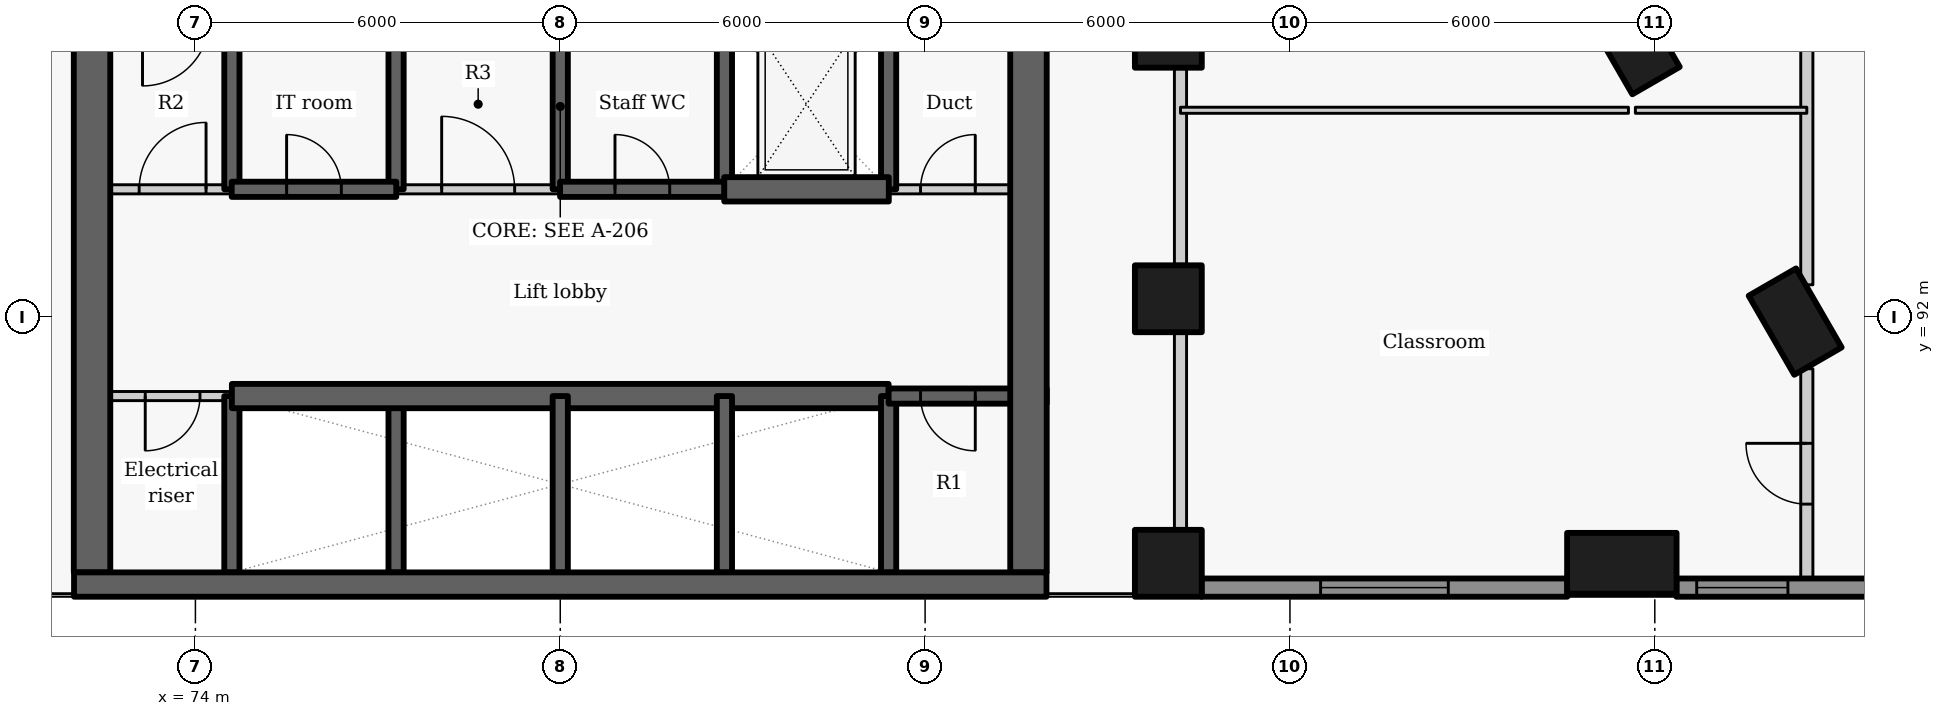
"""IFC4 building model, lengths in metres.
Left out: names, types, materials, properties, quantities, classifications, styles, units other than length and angle.
Written with IfcOpenShell. Run it as: python <this file> out.ifc"""

import sys

from ifc_helpers import new_model, si_unit, direction, frame, frame_2d, origin, origin_2d, place, context, subcontext, project, spatial, rectangle, extrude, element, fill, save


model = new_model("IFC4")
c1 = context("Model", 3, precision=1e-05, world=origin(), true_north=direction((0.0, 1.0)))
c2 = subcontext(c1, "Body", "Model", "MODEL_VIEW")
j1 = project(units=[si_unit("LENGTHUNIT", "METRE"), si_unit("PLANEANGLEUNIT", "RADIAN")], contexts=[c1])
p1 = place(None, origin())
s1 = spatial("IfcSite", under=j1, at=p1, CompositionType="ELEMENT")
p2 = place(p1, origin())
s2 = spatial("IfcBuilding", under=s1, at=p2, CompositionType="ELEMENT")
p3 = place(p2, frame((0.0, 0.0, 24.0)))
s3 = spatial("IfcBuildingStorey", under=s2, at=p3, CompositionType="ELEMENT", Elevation=24.0)
for number, where, z_axis, x_axis in (
    (1, (100.308, 91.925, 0.0), (0.0, 0.0, 1.0), (-0.5, 0.866, 0.0)),
    (2, (97.646, 96.537, 0.0), (0.0, 0.0, 1.0), (-0.5, 0.866, 0.0)),
):
    element("IfcColumn", number, at=place(p3, frame(where, z_axis=z_axis, x_axis=x_axis)), inside=s3, PredefinedType="COLUMN", context=c2, shape_type="SweptSolid", body=[
        extrude(rectangle(XDim=1.5, YDim=0.9, at=origin_2d()), origin(), (0.0, 0.0, 1.0), 4.2),
    ])
for number, where, z_axis, x_axis in (
    (3, (90.0, 87.95, 0.0), (0.0, 0.0, 1.0), (0.0, 1.0, 0.0)),
    (4, (90.0, 92.3, 0.0), (0.0, 0.0, 1.0), (0.0, 1.0, 0.0)),
    (5, (90.0, 96.65, 0.0), (0.0, 0.0, 1.0), (0.0, 1.0, 0.0)),
):
    element("IfcColumn", number, at=place(p3, frame(where, z_axis=z_axis, x_axis=x_axis)), inside=s3, PredefinedType="COLUMN", context=c2, shape_type="SweptSolid", body=[
        extrude(rectangle(XDim=1.1, YDim=1.1, at=origin_2d()), origin(), (0.0, 0.0, 1.0), 4.2),
    ])
p4 = place(p3, frame((97.458, 87.95, 0.0), z_axis=(0.0, 0.0, 1.0), x_axis=(1.0, 0.0, 0.0)))
e6 = element("IfcColumn", 6, at=p4, inside=s3, PredefinedType="COLUMN", context=c2, shape_type="SweptSolid", body=[
    extrude(rectangle(XDim=1.8, YDim=1.0, at=origin_2d()), origin(), (0.0, 0.0, 1.0), 4.2),
])
p5 = place(p3, frame((90.546, 87.55, 0.0), z_axis=(0.0, 0.0, 1.0), x_axis=(1.0, 0.0, 0.0)))
e7 = element("IfcWall", 7, at=p5, inside=s3, PredefinedType="SOLIDWALL", context=c2, shape_type="SweptSolid", body=[
    extrude(rectangle(XDim=6.016, YDim=0.3, at=frame_2d((3.008, 0.0))), origin(), (0.0, 0.0, 1.0), 3.325),
])
p6 = place(p5, frame((1.958, 0.0, 0.9)))
e8 = element("IfcOpeningElement", 8, at=p6, cuts=e7, PredefinedType="OPENING", context=c2, shape_type="SweptSolid", body=[
    extrude(rectangle(XDim=2.1, YDim=2.05, at=frame_2d((1.05, 1.025))), frame((0.0, 0.16, 0.0), z_axis=(0.0, -1.0, 0.0), x_axis=(1.0, 0.0, 0.0)), (0.0, 0.0, 1.0), 0.32),
])
p7 = place(p3, frame((98.354, 87.55, 0.0), z_axis=(0.0, 0.0, 1.0), x_axis=(1.0, 0.0, 0.0)))
e9 = element("IfcWall", 9, at=p7, inside=s3, PredefinedType="SOLIDWALL", context=c2, shape_type="SweptSolid", body=[
    extrude(rectangle(XDim=3.973, YDim=0.3, at=frame_2d((1.986, 0.0))), origin(), (0.0, 0.0, 1.0), 3.325),
])
p8 = place(p7, frame((0.335, 0.0, 0.9)))
e10 = element("IfcOpeningElement", 10, at=p8, cuts=e9, PredefinedType="OPENING", context=c2, shape_type="SweptSolid", body=[
    extrude(rectangle(XDim=1.5, YDim=2.05, at=frame_2d((0.75, 1.025))), frame((0.0, 0.16, 0.0), z_axis=(0.0, -1.0, 0.0), x_axis=(1.0, 0.0, 0.0)), (0.0, 0.0, 1.0), 0.32),
])
p9 = place(p3, frame((74.6, 87.8, -0.3), z_axis=(0.0, 0.0, 1.0), x_axis=(0.0, 1.0, 0.0)))
e11 = element("IfcWall", 11, at=p9, inside=s3, PredefinedType="SHEAR", context=c2, shape_type="SweptSolid", body=[
    extrude(rectangle(XDim=2.9, YDim=0.25, at=frame_2d((1.45, 0.0))), origin(), (0.0, 0.0, 1.0), 4.225),
])
p10 = place(p3, frame((74.6, 94.1, -0.3), z_axis=(0.0, 0.0, 1.0), x_axis=(0.0, 1.0, 0.0)))
e12 = element("IfcWall", 12, at=p10, inside=s3, PredefinedType="SHEAR", context=c2, shape_type="SweptSolid", body=[
    extrude(rectangle(XDim=2.8, YDim=0.25, at=frame_2d((1.4, 0.0))), origin(), (0.0, 0.0, 1.0), 4.225),
])
p11 = place(p3, frame((74.6, 90.7, 0.0), z_axis=(0.0, 0.0, 1.0), x_axis=(-1.0, 0.0, 0.0)))
e13 = element("IfcWall", 13, at=p11, inside=s3, PredefinedType="PARTITIONING", context=c2, shape_type="SweptSolid", body=[
    extrude(rectangle(XDim=2.6, YDim=0.15, at=frame_2d((1.3, 0.0))), origin(), (0.0, 0.0, 1.0), 3.925),
])
p12 = place(p11, frame((0.525, 0.0, 0.0)))
e14 = element("IfcOpeningElement", 14, at=p12, cuts=e13, PredefinedType="OPENING", context=c2, shape_type="SweptSolid", body=[
    extrude(rectangle(XDim=0.9, YDim=2.1, at=frame_2d((0.45, 1.05))), frame((0.0, 0.085, 0.0), z_axis=(0.0, -1.0, 0.0), x_axis=(1.0, 0.0, 0.0)), (0.0, 0.0, 1.0), 0.17),
])
p13 = place(p3, frame((72.3, 87.8, -0.3), z_axis=(0.0, 0.0, 1.0), x_axis=(0.0, 1.0, 0.0)))
e15 = element("IfcWall", 15, at=p13, inside=s3, PredefinedType="SHEAR", context=c2, shape_type="SweptSolid", body=[
    extrude(rectangle(XDim=9.1, YDim=0.6, at=frame_2d((4.55, 0.0))), origin(), (0.0, 0.0, 1.0), 4.225),
])
p14 = place(p3, frame((77.3, 87.8, -0.3), z_axis=(0.0, 0.0, 1.0), x_axis=(0.0, 1.0, 0.0)))
e16 = element("IfcWall", 16, at=p14, inside=s3, PredefinedType="SHEAR", context=c2, shape_type="SweptSolid", body=[
    extrude(rectangle(XDim=2.9, YDim=0.25, at=frame_2d((1.45, 0.0))), origin(), (0.0, 0.0, 1.0), 4.225),
])
p15 = place(p3, frame((77.3, 94.1, -0.3), z_axis=(0.0, 0.0, 1.0), x_axis=(0.0, 1.0, 0.0)))
e17 = element("IfcWall", 17, at=p15, inside=s3, PredefinedType="SHEAR", context=c2, shape_type="SweptSolid", body=[
    extrude(rectangle(XDim=2.8, YDim=0.25, at=frame_2d((1.4, 0.0))), origin(), (0.0, 0.0, 1.0), 4.225),
])
p16 = place(p3, frame((74.6, 90.7, -0.3), z_axis=(0.0, 0.0, 1.0), x_axis=(1.0, 0.0, 0.0)))
e18 = element("IfcWall", 18, at=p16, inside=s3, PredefinedType="SHEAR", context=c2, shape_type="SweptSolid", body=[
    extrude(rectangle(XDim=10.8, YDim=0.4, at=frame_2d((5.4, 0.0))), origin(), (0.0, 0.0, 1.0), 4.225),
])
p17 = place(p3, frame((80.0, 87.8, -0.3), z_axis=(0.0, 0.0, 1.0), x_axis=(0.0, 1.0, 0.0)))
e19 = element("IfcWall", 19, at=p17, inside=s3, PredefinedType="SHEAR", context=c2, shape_type="SweptSolid", body=[
    extrude(rectangle(XDim=2.9, YDim=0.25, at=frame_2d((1.45, 0.0))), origin(), (0.0, 0.0, 1.0), 4.225),
])
p18 = place(p3, frame((80.0, 94.1, -0.3), z_axis=(0.0, 0.0, 1.0), x_axis=(0.0, 1.0, 0.0)))
e20 = element("IfcWall", 20, at=p18, inside=s3, PredefinedType="SHEAR", context=c2, shape_type="SweptSolid", body=[
    extrude(rectangle(XDim=2.8, YDim=0.25, at=frame_2d((1.4, 0.0))), origin(), (0.0, 0.0, 1.0), 4.225),
])
p19 = place(p3, frame((82.7, 87.8, -0.3), z_axis=(0.0, 0.0, 1.0), x_axis=(0.0, 1.0, 0.0)))
e21 = element("IfcWall", 21, at=p19, inside=s3, PredefinedType="SHEAR", context=c2, shape_type="SweptSolid", body=[
    extrude(rectangle(XDim=2.9, YDim=0.25, at=frame_2d((1.45, 0.0))), origin(), (0.0, 0.0, 1.0), 4.225),
])
p20 = place(p3, frame((82.7, 94.1, -0.3), z_axis=(0.0, 0.0, 1.0), x_axis=(0.0, 1.0, 0.0)))
e22 = element("IfcWall", 22, at=p20, inside=s3, PredefinedType="SHEAR", context=c2, shape_type="SweptSolid", body=[
    extrude(rectangle(XDim=2.8, YDim=0.25, at=frame_2d((1.4, 0.0))), origin(), (0.0, 0.0, 1.0), 4.225),
])
p21 = place(p3, frame((85.4, 87.8, -0.3), z_axis=(0.0, 0.0, 1.0), x_axis=(0.0, 1.0, 0.0)))
e23 = element("IfcWall", 23, at=p21, inside=s3, PredefinedType="SHEAR", context=c2, shape_type="SweptSolid", body=[
    extrude(rectangle(XDim=2.9, YDim=0.25, at=frame_2d((1.45, 0.0))), origin(), (0.0, 0.0, 1.0), 4.225),
])
p22 = place(p3, frame((85.4, 94.1, -0.3), z_axis=(0.0, 0.0, 1.0), x_axis=(0.0, 1.0, 0.0)))
e24 = element("IfcWall", 24, at=p22, inside=s3, PredefinedType="SHEAR", context=c2, shape_type="SweptSolid", body=[
    extrude(rectangle(XDim=2.8, YDim=0.25, at=frame_2d((1.4, 0.0))), origin(), (0.0, 0.0, 1.0), 4.225),
])
p23 = place(p3, frame((88.0, 90.7, -0.3), z_axis=(0.0, 0.0, 1.0), x_axis=(-1.0, 0.0, 0.0)))
e25 = element("IfcWall", 25, at=p23, inside=s3, PredefinedType="SHEAR", context=c2, shape_type="SweptSolid", body=[
    extrude(rectangle(XDim=2.6, YDim=0.25, at=frame_2d((1.3, 0.0))), origin(), (0.0, 0.0, 1.0), 4.225),
])
p24 = place(p23, frame((1.175, 0.0, 0.3)))
e26 = element("IfcOpeningElement", 26, at=p24, cuts=e25, PredefinedType="OPENING", context=c2, shape_type="SweptSolid", body=[
    extrude(rectangle(XDim=0.9, YDim=2.1, at=frame_2d((0.45, 1.05))), frame((0.0, 0.135, 0.0), z_axis=(0.0, -1.0, 0.0), x_axis=(1.0, 0.0, 0.0)), (0.0, 0.0, 1.0), 0.27),
])
p25 = place(p3, frame((87.7, 103.4, -0.3), z_axis=(0.0, 0.0, 1.0), x_axis=(0.0, -1.0, 0.0)))
e27 = element("IfcWall", 27, at=p25, inside=s3, PredefinedType="SHEAR", context=c2, shape_type="SweptSolid", body=[
    extrude(rectangle(XDim=15.6, YDim=0.6, at=frame_2d((7.8, 0.0))), origin(), (0.0, 0.0, 1.0), 4.225),
])
p26 = place(p25, frame((2.7, 0.0, 0.3)))
e28 = element("IfcOpeningElement", 28, at=p26, cuts=e27, PredefinedType="OPENING", context=c2, shape_type="SweptSolid", body=[
    extrude(rectangle(XDim=1.1, YDim=2.1, at=frame_2d((0.55, 1.05))), frame((0.0, 0.31, 0.0), z_axis=(0.0, -1.0, 0.0), x_axis=(1.0, 0.0, 0.0)), (0.0, 0.0, 1.0), 0.62),
])
p27 = place(p3, frame((72.0, 94.1, 0.0), z_axis=(0.0, 0.0, 1.0), x_axis=(1.0, 0.0, 0.0)))
e29 = element("IfcWall", 29, at=p27, inside=s3, PredefinedType="PARTITIONING", context=c2, shape_type="SweptSolid", body=[
    extrude(rectangle(XDim=2.603, YDim=0.15, at=frame_2d((1.302, 0.0))), origin(), (0.0, 0.0, 1.0), 3.925),
])
p28 = place(p27, frame((1.075, 0.0, 0.0)))
e30 = element("IfcOpeningElement", 30, at=p28, cuts=e29, PredefinedType="OPENING", context=c2, shape_type="SweptSolid", body=[
    extrude(rectangle(XDim=1.1, YDim=2.1, at=frame_2d((0.55, 1.05))), frame((0.0, 0.085, 0.0), z_axis=(0.0, -1.0, 0.0), x_axis=(1.0, 0.0, 0.0)), (0.0, 0.0, 1.0), 0.17),
])
p29 = place(p3, frame((77.297, 94.1, 0.0), z_axis=(0.0, 0.0, 1.0), x_axis=(1.0, 0.0, 0.0)))
e31 = element("IfcWall", 31, at=p29, inside=s3, PredefinedType="PARTITIONING", context=c2, shape_type="SweptSolid", body=[
    extrude(rectangle(XDim=2.706, YDim=0.15, at=frame_2d((1.353, 0.0))), origin(), (0.0, 0.0, 1.0), 3.925),
])
p30 = place(p29, frame((0.753, 0.0, 0.0)))
e32 = element("IfcOpeningElement", 32, at=p30, cuts=e31, PredefinedType="OPENING", context=c2, shape_type="SweptSolid", body=[
    extrude(rectangle(XDim=1.2, YDim=2.1, at=frame_2d((0.6, 1.05))), frame((0.0, 0.085, 0.0), z_axis=(0.0, -1.0, 0.0), x_axis=(1.0, 0.0, 0.0)), (0.0, 0.0, 1.0), 0.17),
])
p31 = place(p3, frame((85.397, 94.1, 0.0), z_axis=(0.0, 0.0, 1.0), x_axis=(1.0, 0.0, 0.0)))
e33 = element("IfcWall", 33, at=p31, inside=s3, PredefinedType="PARTITIONING", context=c2, shape_type="SweptSolid", body=[
    extrude(rectangle(XDim=2.603, YDim=0.15, at=frame_2d((1.302, 0.0))), origin(), (0.0, 0.0, 1.0), 3.925),
])
p32 = place(p31, frame((0.528, 0.0, 0.0)))
e34 = element("IfcOpeningElement", 34, at=p32, cuts=e33, PredefinedType="OPENING", context=c2, shape_type="SweptSolid", body=[
    extrude(rectangle(XDim=0.9, YDim=2.1, at=frame_2d((0.45, 1.05))), frame((0.0, 0.085, 0.0), z_axis=(0.0, -1.0, 0.0), x_axis=(1.0, 0.0, 0.0)), (0.0, 0.0, 1.0), 0.17),
])
p33 = place(p3, frame((74.597, 94.1, -0.3), z_axis=(0.0, 0.0, 1.0), x_axis=(1.0, 0.0, 0.0)))
e35 = element("IfcWall", 35, at=p33, inside=s3, PredefinedType="SHEAR", context=c2, shape_type="SweptSolid", body=[
    extrude(rectangle(XDim=2.706, YDim=0.25, at=frame_2d((1.353, 0.0))), origin(), (0.0, 0.0, 1.0), 4.225),
])
p34 = place(p33, frame((0.903, 0.0, 0.3)))
e36 = element("IfcOpeningElement", 36, at=p34, cuts=e35, PredefinedType="OPENING", context=c2, shape_type="SweptSolid", body=[
    extrude(rectangle(XDim=0.9, YDim=2.1, at=frame_2d((0.45, 1.05))), frame((0.0, 0.135, 0.0), z_axis=(0.0, -1.0, 0.0), x_axis=(1.0, 0.0, 0.0)), (0.0, 0.0, 1.0), 0.27),
])
p35 = place(p3, frame((79.997, 94.1, -0.3), z_axis=(0.0, 0.0, 1.0), x_axis=(1.0, 0.0, 0.0)))
e37 = element("IfcWall", 37, at=p35, inside=s3, PredefinedType="SHEAR", context=c2, shape_type="SweptSolid", body=[
    extrude(rectangle(XDim=2.706, YDim=0.25, at=frame_2d((1.353, 0.0))), origin(), (0.0, 0.0, 1.0), 4.225),
])
p36 = place(p35, frame((0.903, 0.0, 0.3)))
e38 = element("IfcOpeningElement", 38, at=p36, cuts=e37, PredefinedType="OPENING", context=c2, shape_type="SweptSolid", body=[
    extrude(rectangle(XDim=0.9, YDim=2.1, at=frame_2d((0.45, 1.05))), frame((0.0, 0.135, 0.0), z_axis=(0.0, -1.0, 0.0), x_axis=(1.0, 0.0, 0.0)), (0.0, 0.0, 1.0), 0.27),
])
p37 = place(p3, frame((82.697, 94.1, -0.3), z_axis=(0.0, 0.0, 1.0), x_axis=(1.0, 0.0, 0.0)))
e39 = element("IfcWall", 39, at=p37, inside=s3, PredefinedType="SHEAR", context=c2, shape_type="SweptSolid", body=[
    extrude(rectangle(XDim=2.706, YDim=0.4, at=frame_2d((1.353, 0.0))), origin(), (0.0, 0.0, 1.0), 4.225),
])
p38 = place(p3, frame((100.5, 87.7, 0.0), z_axis=(0.0, 0.0, 1.0), x_axis=(0.0, 1.0, 0.0)))
e40 = element("IfcWall", 40, at=p38, inside=s3, PredefinedType="PARTITIONING", context=c2, shape_type="SweptSolid", body=[
    extrude(rectangle(XDim=3.449, YDim=0.2, at=frame_2d((1.725, 0.0))), origin(), (0.0, 0.0, 1.0), 3.405),
])
p39 = place(p38, frame((1.223, 0.0, 0.0)))
e41 = element("IfcOpeningElement", 41, at=p39, cuts=e40, PredefinedType="OPENING", context=c2, shape_type="SweptSolid", body=[
    extrude(rectangle(XDim=1.0, YDim=2.1, at=frame_2d((0.5, 1.05))), frame((0.0, 0.11, 0.0), z_axis=(0.0, -1.0, 0.0), x_axis=(1.0, 0.0, 0.0)), (0.0, 0.0, 1.0), 0.22),
])
p40 = place(p3, frame((100.5, 92.53, 0.0), z_axis=(0.0, 0.0, 1.0), x_axis=(0.0, 1.0, 0.0)))
e42 = element("IfcWall", 42, at=p40, inside=s3, PredefinedType="PARTITIONING", context=c2, shape_type="SweptSolid", body=[
    extrude(rectangle(XDim=10.873, YDim=0.2, at=frame_2d((5.437, 0.0))), origin(), (0.0, 0.0, 1.0), 3.925),
])
p41 = place(p40, frame((6.37, 0.0, 0.0)))
e43 = element("IfcOpeningElement", 43, at=p41, cuts=e42, PredefinedType="OPENING", context=c2, shape_type="SweptSolid", body=[
    extrude(rectangle(XDim=1.0, YDim=2.1, at=frame_2d((0.5, 1.05))), frame((0.0, 0.11, 0.0), z_axis=(0.0, -1.0, 0.0), x_axis=(1.0, 0.0, 0.0)), (0.0, 0.0, 1.0), 0.22),
])
p42 = place(p3, frame((90.2, 88.517, 0.0), z_axis=(0.0, 0.0, 1.0), x_axis=(0.0, 1.0, 0.0)))
e44 = element("IfcWall", 44, at=p42, inside=s3, PredefinedType="PARTITIONING", context=c2, shape_type="SweptSolid", body=[
    extrude(rectangle(XDim=3.216, YDim=0.2, at=frame_2d((1.608, 0.0))), origin(), (0.0, 0.0, 1.0), 3.405),
])
p43 = place(p3, frame((90.2, 92.867, 0.0), z_axis=(0.0, 0.0, 1.0), x_axis=(0.0, 1.0, 0.0)))
e45 = element("IfcWall", 45, at=p43, inside=s3, PredefinedType="PARTITIONING", context=c2, shape_type="SweptSolid", body=[
    extrude(rectangle(XDim=3.216, YDim=0.2, at=frame_2d((1.608, 0.0))), origin(), (0.0, 0.0, 1.0), 3.405),
])
p44 = place(p3, frame((90.2, 95.4, 0.0), z_axis=(0.0, 0.0, 1.0), x_axis=(1.0, 0.0, 0.0)))
e46 = element("IfcWall", 46, at=p44, inside=s3, PredefinedType="PARTITIONING", context=c2, shape_type="SweptSolid", body=[
    extrude(rectangle(XDim=7.366, YDim=0.1, at=frame_2d((3.683, 0.0))), origin(), (0.0, 0.0, 1.0), 3.925),
])
p45 = place(p3, frame((97.68, 95.4, 0.0), z_axis=(0.0, 0.0, 1.0), x_axis=(1.0, 0.0, 0.0)))
e47 = element("IfcWall", 47, at=p45, inside=s3, PredefinedType="PARTITIONING", context=c2, shape_type="SweptSolid", body=[
    extrude(rectangle(XDim=2.82, YDim=0.1, at=frame_2d((1.41, 0.0))), origin(), (0.0, 0.0, 1.0), 3.305),
])
p46 = place(p3, frame((72.004, 87.6, -0.3), z_axis=(0.0, 0.0, 1.0), x_axis=(1.0, 0.0, 0.0)))
e48 = element("IfcWall", 48, at=p46, inside=s3, PredefinedType="SHEAR", context=c2, shape_type="SweptSolid", body=[
    extrude(rectangle(XDim=15.992, YDim=0.4, at=frame_2d((7.996, 0.0))), origin(), (0.0, 0.0, 1.0), 4.225),
])
p47 = place(p6, origin())
e49 = element("IfcWindow", 49, at=p47, inside=s3, PartitioningType="SINGLE_PANEL", PredefinedType="WINDOW", context=c2, shape_type="SweptSolid", body=[
    extrude(rectangle(XDim=2.1, YDim=2.05, at=frame_2d((1.05, 1.025))), frame((0.0, 0.03, 0.0), z_axis=(0.0, -1.0, 0.0), x_axis=(1.0, 0.0, 0.0)), (0.0, 0.0, 1.0), 0.06),
])
fill(e8, e49)
p48 = place(p8, origin())
e50 = element("IfcWindow", 50, at=p48, inside=s3, PartitioningType="SINGLE_PANEL", PredefinedType="WINDOW", context=c2, shape_type="SweptSolid", body=[
    extrude(rectangle(XDim=1.5, YDim=2.05, at=frame_2d((0.75, 1.025))), frame((0.0, 0.03, 0.0), z_axis=(0.0, -1.0, 0.0), x_axis=(1.0, 0.0, 0.0)), (0.0, 0.0, 1.0), 0.06),
])
fill(e10, e50)
p49 = place(p12, origin())
e51 = element("IfcDoor", 51, at=p49, inside=s3, OperationType="SINGLE_SWING_RIGHT", PredefinedType="DOOR", context=c2, shape_type="SweptSolid", body=[
    extrude(rectangle(XDim=0.9, YDim=2.1, at=frame_2d((0.45, 1.05))), frame((0.0, 0.025, 0.0), z_axis=(0.0, -1.0, 0.0), x_axis=(1.0, 0.0, 0.0)), (0.0, 0.0, 1.0), 0.05),
])
fill(e14, e51)
p50 = place(p24, origin())
e52 = element("IfcDoor", 52, at=p50, inside=s3, OperationType="SINGLE_SWING_LEFT", PredefinedType="DOOR", context=c2, shape_type="SweptSolid", body=[
    extrude(rectangle(XDim=0.9, YDim=2.1, at=frame_2d((0.45, 1.05))), frame((0.0, 0.025, 0.0), z_axis=(0.0, -1.0, 0.0), x_axis=(1.0, 0.0, 0.0)), (0.0, 0.0, 1.0), 0.05),
])
fill(e26, e52)
p51 = place(p28, origin())
e53 = element("IfcDoor", 53, at=p51, inside=s3, OperationType="SINGLE_SWING_RIGHT", PredefinedType="DOOR", context=c2, shape_type="SweptSolid", body=[
    extrude(rectangle(XDim=1.1, YDim=2.1, at=frame_2d((0.55, 1.05))), frame((0.0, 0.025, 0.0), z_axis=(0.0, -1.0, 0.0), x_axis=(1.0, 0.0, 0.0)), (0.0, 0.0, 1.0), 0.05),
])
fill(e30, e53)
p52 = place(p34, origin())
e54 = element("IfcDoor", 54, at=p52, inside=s3, OperationType="SINGLE_SWING_LEFT", PredefinedType="DOOR", context=c2, shape_type="SweptSolid", body=[
    extrude(rectangle(XDim=0.9, YDim=2.1, at=frame_2d((0.45, 1.05))), frame((0.0, 0.025, 0.0), z_axis=(0.0, -1.0, 0.0), x_axis=(1.0, 0.0, 0.0)), (0.0, 0.0, 1.0), 0.05),
])
fill(e36, e54)
p53 = place(p30, origin())
e55 = element("IfcDoor", 55, at=p53, inside=s3, OperationType="DOUBLE_DOOR_SINGLE_SWING", PredefinedType="DOOR", context=c2, shape_type="SweptSolid", body=[
    extrude(rectangle(XDim=1.2, YDim=2.1, at=frame_2d((0.6, 1.05))), frame((0.0, 0.025, 0.0), z_axis=(0.0, -1.0, 0.0), x_axis=(1.0, 0.0, 0.0)), (0.0, 0.0, 1.0), 0.05),
])
fill(e32, e55)
p54 = place(p36, origin())
e56 = element("IfcDoor", 56, at=p54, inside=s3, OperationType="SINGLE_SWING_LEFT", PredefinedType="DOOR", context=c2, shape_type="SweptSolid", body=[
    extrude(rectangle(XDim=0.9, YDim=2.1, at=frame_2d((0.45, 1.05))), frame((0.0, 0.025, 0.0), z_axis=(0.0, -1.0, 0.0), x_axis=(1.0, 0.0, 0.0)), (0.0, 0.0, 1.0), 0.05),
])
fill(e38, e56)
p55 = place(p32, origin())
e57 = element("IfcDoor", 57, at=p55, inside=s3, OperationType="SINGLE_SWING_RIGHT", PredefinedType="DOOR", context=c2, shape_type="SweptSolid", body=[
    extrude(rectangle(XDim=0.9, YDim=2.1, at=frame_2d((0.45, 1.05))), frame((0.0, 0.025, 0.0), z_axis=(0.0, -1.0, 0.0), x_axis=(1.0, 0.0, 0.0)), (0.0, 0.0, 1.0), 0.05),
])
fill(e34, e57)
p56 = place(p39, origin())
e58 = element("IfcDoor", 58, at=p56, inside=s3, OperationType="SINGLE_SWING_RIGHT", PredefinedType="DOOR", context=c2, shape_type="SweptSolid", body=[
    extrude(rectangle(XDim=1.0, YDim=2.1, at=frame_2d((0.5, 1.05))), frame((0.0, 0.025, 0.0), z_axis=(0.0, -1.0, 0.0), x_axis=(1.0, 0.0, 0.0)), (0.0, 0.0, 1.0), 0.05),
])
fill(e41, e58)
save(model, sys.argv[1])
